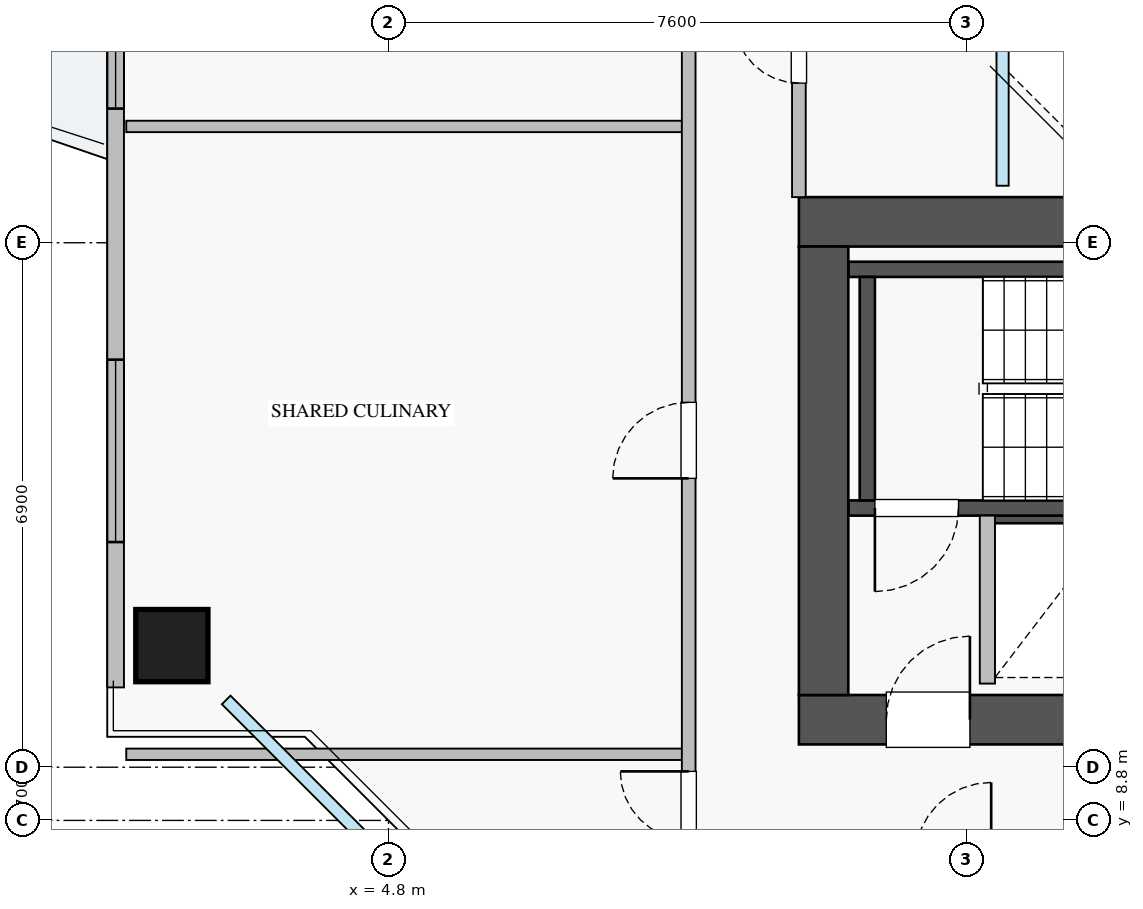
"""IFC4 building model, lengths in metres.
Left out: names, types, materials, properties, quantities, classifications, styles, units other than length and angle.
Written with IfcOpenShell. Run it as: python <this file> out.ifc"""

import sys

from ifc_helpers import new_model, si_unit, direction, frame, frame_2d, origin, origin_2d, place, context, subcontext, project, spatial, rectangle, extrude, source, transform, mapped, element, fill, save


model = new_model("IFC4")
c1 = context("Model", 3, precision=1e-05, world=origin(), true_north=direction((0.0, 1.0)))
c2 = subcontext(c1, "Body", "Model", "MODEL_VIEW")
j1 = project(units=[si_unit("LENGTHUNIT", "METRE"), si_unit("PLANEANGLEUNIT", "RADIAN")], contexts=[c1])
p1 = place(None, origin())
s1 = spatial("IfcSite", under=j1, at=p1, CompositionType="ELEMENT")
p2 = place(p1, origin())
s2 = spatial("IfcBuilding", under=s1, at=p2, CompositionType="ELEMENT")
p3 = place(p2, frame((0.0, 0.0, 150.25)))
s3 = spatial("IfcBuildingStorey", under=s2, at=p3, CompositionType="ELEMENT", Elevation=150.25)
p4 = place(p3, frame((12.68, 12.8, 0.0), z_axis=(0.0, 0.0, 1.0), x_axis=(1.0, 0.0, 0.0)))
e1 = element("IfcWall", 1, at=p4, inside=s3, PredefinedType="SHEAR", context=c2, shape_type="SweptSolid", body=[
    extrude(rectangle(XDim=1.94, YDim=0.18, at=frame_2d((0.97, 0.0))), origin(), (0.0, 0.0, 1.0), 3.07),
])
p5 = place(p3, frame((10.85, 12.91, 0.0), z_axis=(0.0, 0.0, 1.0), x_axis=(1.0, 0.0, 0.0)))
e2 = element("IfcWall", 2, at=p5, inside=s3, PredefinedType="SHEAR", context=c2, shape_type="SweptSolid", body=[
    extrude(rectangle(XDim=7.3, YDim=0.2, at=frame_2d((3.65, 0.0))), origin(), (0.0, 0.0, 1.0), 3.25),
])
p6 = place(p5, frame((0.35, 0.0, 0.0)))
e3 = element("IfcOpeningElement", 3, at=p6, cuts=e2, PredefinedType="OPENING", context=c2, shape_type="SweptSolid", body=[
    extrude(rectangle(XDim=1.1, YDim=2.05, at=frame_2d((0.55, 1.025))), frame((0.0, 0.11, 0.0), z_axis=(0.0, -1.0, 0.0), x_axis=(1.0, 0.0, 0.0)), (0.0, 0.0, 1.0), 0.22),
])
p7 = place(p3, frame((10.85, 16.05, 0.0), z_axis=(0.0, 0.0, 1.0), x_axis=(1.0, 0.0, 0.0)))
e4 = element("IfcWall", 4, at=p7, inside=s3, PredefinedType="SHEAR", context=c2, shape_type="SweptSolid", body=[
    extrude(rectangle(XDim=7.3, YDim=0.2, at=frame_2d((3.65, 0.0))), origin(), (0.0, 0.0, 1.0), 3.25),
])
p8 = place(p3, frame((11.1, 13.01, 0.0), z_axis=(0.0, 0.0, 1.0), x_axis=(0.0, 1.0, 0.0)))
e5 = element("IfcWall", 5, at=p8, inside=s3, PredefinedType="SHEAR", context=c2, shape_type="SweptSolid", body=[
    extrude(rectangle(XDim=2.94, YDim=0.2, at=frame_2d((1.47, 0.0))), origin(), (0.0, 0.0, 1.0), 3.25),
])
p9 = place(p3, frame((10.2, 10.125, 0.0), z_axis=(0.0, 0.0, 1.0), x_axis=(1.0, 0.0, 0.0)))
e6 = element("IfcWall", 6, at=p9, inside=s3, PredefinedType="SHEAR", context=c2, shape_type="SweptSolid", body=[
    extrude(rectangle(XDim=17.6, YDim=0.65, at=frame_2d((8.8, 0.0))), origin(), (0.0, 0.0, 1.0), 3.25),
])
p10 = place(p9, frame((1.15, 0.0, 0.0)))
e7 = element("IfcOpeningElement", 7, at=p10, cuts=e6, PredefinedType="OPENING", context=c2, shape_type="SweptSolid", body=[
    extrude(rectangle(XDim=1.1, YDim=2.05, at=frame_2d((0.55, 1.025))), frame((0.0, 0.335, 0.0), z_axis=(0.0, -1.0, 0.0), x_axis=(1.0, 0.0, 0.0)), (0.0, 0.0, 1.0), 0.67),
])
p11 = place(p9, frame((8.3, 0.0, 0.0)))
e8 = element("IfcOpeningElement", 8, at=p11, cuts=e6, PredefinedType="OPENING", context=c2, shape_type="SweptSolid", body=[
    extrude(rectangle(XDim=1.1, YDim=2.05, at=frame_2d((0.55, 1.025))), frame((0.0, 0.335, 0.0), z_axis=(0.0, -1.0, 0.0), x_axis=(1.0, 0.0, 0.0)), (0.0, 0.0, 1.0), 0.67),
])
p12 = place(p9, frame((4.9, 0.0, 0.0)))
e9 = element("IfcOpeningElement", 9, at=p12, cuts=e6, PredefinedType="OPENING", context=c2, shape_type="SweptSolid", body=[
    extrude(rectangle(XDim=1.1, YDim=2.05, at=frame_2d((0.55, 1.025))), frame((0.0, 0.335, 0.0), z_axis=(0.0, -1.0, 0.0), x_axis=(1.0, 0.0, 0.0)), (0.0, 0.0, 1.0), 0.67),
])
p13 = place(p9, frame((14.74, 0.0, 0.0)))
e10 = element("IfcOpeningElement", 10, at=p13, cuts=e6, PredefinedType="OPENING", context=c2, shape_type="SweptSolid", body=[
    extrude(rectangle(XDim=1.0, YDim=2.05, at=frame_2d((0.5, 1.025))), frame((0.0, 0.335, 0.0), z_axis=(0.0, -1.0, 0.0), x_axis=(1.0, 0.0, 0.0)), (0.0, 0.0, 1.0), 0.67),
])
p14 = place(p9, frame((10.64, 0.0, 0.0)))
e11 = element("IfcOpeningElement", 11, at=p14, cuts=e6, PredefinedType="OPENING", context=c2, shape_type="SweptSolid", body=[
    extrude(rectangle(XDim=1.0, YDim=2.05, at=frame_2d((0.5, 1.025))), frame((0.0, 0.335, 0.0), z_axis=(0.0, -1.0, 0.0), x_axis=(1.0, 0.0, 0.0)), (0.0, 0.0, 1.0), 0.67),
])
p15 = place(p9, frame((13.09, 0.0, 0.0)))
e12 = element("IfcOpeningElement", 12, at=p15, cuts=e6, PredefinedType="OPENING", context=c2, shape_type="SweptSolid", body=[
    extrude(rectangle(XDim=1.0, YDim=2.05, at=frame_2d((0.5, 1.025))), frame((0.0, 0.335, 0.0), z_axis=(0.0, -1.0, 0.0), x_axis=(1.0, 0.0, 0.0)), (0.0, 0.0, 1.0), 0.67),
])
p16 = place(p3, frame((10.2, 16.675, 0.0), z_axis=(0.0, 0.0, 1.0), x_axis=(1.0, 0.0, 0.0)))
e13 = element("IfcWall", 13, at=p16, inside=s3, PredefinedType="SHEAR", context=c2, shape_type="SweptSolid", body=[
    extrude(rectangle(XDim=17.6, YDim=0.65, at=frame_2d((8.8, 0.0))), origin(), (0.0, 0.0, 1.0), 3.25),
])
p17 = place(p3, frame((10.525, 10.45, 0.0), z_axis=(0.0, 0.0, 1.0), x_axis=(0.0, 1.0, 0.0)))
e14 = element("IfcWall", 14, at=p17, inside=s3, PredefinedType="SHEAR", context=c2, shape_type="SweptSolid", body=[
    extrude(rectangle(XDim=5.9, YDim=0.65, at=frame_2d((2.95, 0.0))), origin(), (0.0, 0.0, 1.0), 3.25),
])
m1 = source(origin(), c2, "Body", "SweptSolid", [
    extrude(rectangle(XDim=0.95, YDim=0.95, at=origin_2d()), origin(), (0.0, 0.0, 1.0), 3.25),
])
p18 = place(p3, frame((1.95, 11.1, 0.0), z_axis=(0.0, 0.0, 1.0), x_axis=(1.0, 0.0, 0.0)))
e15 = element("IfcColumn", 15, at=p18, inside=s3, PredefinedType="COLUMN", context=c2, shape_type="MappedRepresentation", body=[
    mapped(m1, transform((0.0, 0.0, 0.0), x_axis=(1.0, 0.0, 0.0), y_axis=(0.0, 1.0, 0.0), z_axis=(0.0, 0.0, 1.0), scale=1.0)),
])
p19 = place(p3, frame((1.21, 10.55, 0.0), z_axis=(0.0, 0.0, 1.0), x_axis=(0.0, 1.0, 0.0)))
e16 = element("IfcWall", 16, at=p19, inside=s3, PredefinedType="STANDARD", context=c2, shape_type="SweptSolid", body=[
    extrude(rectangle(XDim=24.9, YDim=0.22, at=frame_2d((12.45, 0.0))), origin(), (0.0, 0.0, 1.0), 2.61),
])
p20 = place(p19, frame((13.3, 0.0, 0.0)))
e17 = element("IfcOpeningElement", 17, at=p20, cuts=e16, PredefinedType="OPENING", context=c2, shape_type="SweptSolid", body=[
    extrude(rectangle(XDim=1.2, YDim=2.1, at=frame_2d((0.6, 1.05))), frame((0.0, 0.12, 0.0), z_axis=(0.0, -1.0, 0.0), x_axis=(1.0, 0.0, 0.0)), (0.0, 0.0, 1.0), 0.24),
])
p21 = place(p19, frame((1.912, 0.0, 0.9)))
e18 = element("IfcOpeningElement", 18, at=p21, cuts=e16, PredefinedType="OPENING", context=c2, shape_type="SweptSolid", body=[
    extrude(rectangle(XDim=2.4, YDim=1.48, at=frame_2d((1.2, 0.74))), frame((0.0, 0.12, 0.0), z_axis=(0.0, -1.0, 0.0), x_axis=(1.0, 0.0, 0.0)), (0.0, 0.0, 1.0), 0.24),
])
p22 = place(p19, frame((21.82, 0.0, 0.9)))
e19 = element("IfcOpeningElement", 19, at=p22, cuts=e16, PredefinedType="OPENING", context=c2, shape_type="SweptSolid", body=[
    extrude(rectangle(XDim=2.1, YDim=1.5, at=frame_2d((1.05, 0.75))), frame((0.0, 0.12, 0.0), z_axis=(0.0, -1.0, 0.0), x_axis=(1.0, 0.0, 0.0)), (0.0, 0.0, 1.0), 0.24),
])
p23 = place(p19, frame((12.05, 0.0, 0.9)))
e20 = element("IfcOpeningElement", 20, at=p23, cuts=e16, PredefinedType="OPENING", context=c2, shape_type="SweptSolid", body=[
    extrude(rectangle(XDim=0.9, YDim=1.2, at=frame_2d((0.45, 0.6))), frame((0.0, 0.12, 0.0), z_axis=(0.0, -1.0, 0.0), x_axis=(1.0, 0.0, 0.0)), (0.0, 0.0, 1.0), 0.24),
])
p24 = place(p19, frame((7.615, 0.0, 0.9)))
e21 = element("IfcOpeningElement", 21, at=p24, cuts=e16, PredefinedType="OPENING", context=c2, shape_type="SweptSolid", body=[
    extrude(rectangle(XDim=0.9, YDim=1.2, at=frame_2d((0.45, 0.6))), frame((0.0, 0.12, 0.0), z_axis=(0.0, -1.0, 0.0), x_axis=(1.0, 0.0, 0.0)), (0.0, 0.0, 1.0), 0.24),
])
p25 = place(p19, frame((16.895, 0.0, 0.9)))
e22 = element("IfcOpeningElement", 22, at=p25, cuts=e16, PredefinedType="OPENING", context=c2, shape_type="SweptSolid", body=[
    extrude(rectangle(XDim=0.9, YDim=1.2, at=frame_2d((0.45, 0.6))), frame((0.0, 0.12, 0.0), z_axis=(0.0, -1.0, 0.0), x_axis=(1.0, 0.0, 0.0)), (0.0, 0.0, 1.0), 0.24),
])
p26 = place(p3, frame((12.68, 10.6, 0.0), z_axis=(0.0, 0.0, 1.0), x_axis=(0.0, 1.0, 0.0)))
e23 = element("IfcWall", 23, at=p26, inside=s3, PredefinedType="PARTITIONING", context=c2, shape_type="SweptSolid", body=[
    extrude(rectangle(XDim=2.21, YDim=0.2, at=frame_2d((1.105, 0.0))), origin(), (0.0, 0.0, 1.0), 3.07),
])
for number, where, z_axis, x_axis in (
    (24, (1.35, 9.67, 0.0), (0.0, 0.0, 1.0), (1.0, 0.0, 0.0)),
    (25, (1.35, 17.93, 0.0), (0.0, 0.0, 1.0), (1.0, 0.0, 0.0)),
):
    element("IfcWall", number, at=place(p3, frame(where, z_axis=z_axis, x_axis=x_axis)), inside=s3, PredefinedType="PARTITIONING", context=c2, shape_type="SweptSolid", body=[
        extrude(rectangle(XDim=7.4, YDim=0.15, at=frame_2d((3.7, 0.0))), origin(), (0.0, 0.0, 1.0), 3.07),
    ])
p27 = place(p3, frame((8.75, 8.3, 0.0), z_axis=(0.0, 0.0, 1.0), x_axis=(0.0, 1.0, 0.0)))
e26 = element("IfcWall", 26, at=p27, inside=s3, PredefinedType="PARTITIONING", context=c2, shape_type="SweptSolid", body=[
    extrude(rectangle(XDim=29.4, YDim=0.18, at=frame_2d((14.7, 0.0))), origin(), (0.0, 0.0, 1.0), 3.07),
])
p28 = place(p27, frame((28.08, 0.0, 0.0)))
e27 = element("IfcOpeningElement", 27, at=p28, cuts=e26, PredefinedType="OPENING", context=c2, shape_type="SweptSolid", body=[
    extrude(rectangle(XDim=0.9, YDim=2.05, at=frame_2d((0.45, 1.025))), frame((0.0, 0.1, 0.0), z_axis=(0.0, -1.0, 0.0), x_axis=(1.0, 0.0, 0.0)), (0.0, 0.0, 1.0), 0.2),
])
p29 = place(p27, frame((0.245, 0.0, 0.0)))
e28 = element("IfcOpeningElement", 28, at=p29, cuts=e26, PredefinedType="OPENING", context=c2, shape_type="SweptSolid", body=[
    extrude(rectangle(XDim=0.9, YDim=2.05, at=frame_2d((0.45, 1.025))), frame((0.0, 0.1, 0.0), z_axis=(0.0, -1.0, 0.0), x_axis=(1.0, 0.0, 0.0)), (0.0, 0.0, 1.0), 0.2),
])
p30 = place(p27, frame((5.0, 0.0, 0.0)))
e29 = element("IfcOpeningElement", 29, at=p30, cuts=e26, PredefinedType="OPENING", context=c2, shape_type="SweptSolid", body=[
    extrude(rectangle(XDim=1.0, YDim=2.05, at=frame_2d((0.5, 1.025))), frame((0.0, 0.1, 0.0), z_axis=(0.0, -1.0, 0.0), x_axis=(1.0, 0.0, 0.0)), (0.0, 0.0, 1.0), 0.2),
])
p31 = place(p27, frame((11.165, 0.0, 0.0)))
e30 = element("IfcOpeningElement", 30, at=p31, cuts=e26, PredefinedType="OPENING", context=c2, shape_type="SweptSolid", body=[
    extrude(rectangle(XDim=1.0, YDim=2.05, at=frame_2d((0.5, 1.025))), frame((0.0, 0.1, 0.0), z_axis=(0.0, -1.0, 0.0), x_axis=(1.0, 0.0, 0.0)), (0.0, 0.0, 1.0), 0.2),
])
p32 = place(p27, frame((20.325, 0.0, 0.0)))
e31 = element("IfcOpeningElement", 31, at=p32, cuts=e26, PredefinedType="OPENING", context=c2, shape_type="SweptSolid", body=[
    extrude(rectangle(XDim=1.0, YDim=2.05, at=frame_2d((0.5, 1.025))), frame((0.0, 0.1, 0.0), z_axis=(0.0, -1.0, 0.0), x_axis=(1.0, 0.0, 0.0)), (0.0, 0.0, 1.0), 0.2),
])
p33 = place(p3, frame((10.2, 17.0, 0.0), z_axis=(0.0, 0.0, 1.0), x_axis=(0.0, 1.0, 0.0)))
e32 = element("IfcWall", 32, at=p33, inside=s3, PredefinedType="PARTITIONING", context=c2, shape_type="SweptSolid", body=[
    extrude(rectangle(XDim=12.0, YDim=0.18, at=frame_2d((6.0, 0.0))), origin(), (0.0, 0.0, 1.0), 3.07),
])
p34 = place(p33, frame((1.5, 0.0, 0.0)))
e33 = element("IfcOpeningElement", 33, at=p34, cuts=e32, PredefinedType="OPENING", context=c2, shape_type="SweptSolid", body=[
    extrude(rectangle(XDim=0.85, YDim=2.05, at=frame_2d((0.425, 1.025))), frame((0.0, 0.1, 0.0), z_axis=(0.0, -1.0, 0.0), x_axis=(1.0, 0.0, 0.0)), (0.0, 0.0, 1.0), 0.2),
])
p35 = place(p33, frame((6.5, 0.0, 0.0)))
e34 = element("IfcOpeningElement", 34, at=p35, cuts=e32, PredefinedType="OPENING", context=c2, shape_type="SweptSolid", body=[
    extrude(rectangle(XDim=1.0, YDim=2.05, at=frame_2d((0.5, 1.025))), frame((0.0, 0.1, 0.0), z_axis=(0.0, -1.0, 0.0), x_axis=(1.0, 0.0, 0.0)), (0.0, 0.0, 1.0), 0.2),
])
m2 = source(origin(), c2, "Body", "SweptSolid", [
    extrude(rectangle(XDim=2.4, YDim=1.48, at=frame_2d((1.2, 0.74))), frame((0.0, 0.03, 0.0), z_axis=(0.0, -1.0, 0.0), x_axis=(1.0, 0.0, 0.0)), (0.0, 0.0, 1.0), 0.06),
])
p36 = place(p21, origin())
e35 = element("IfcWindow", 35, at=p36, inside=s3, PartitioningType="TRIPLE_PANEL_VERTICAL", PredefinedType="WINDOW", context=c2, shape_type="MappedRepresentation", body=[
    mapped(m2, transform((0.0, 0.0, 0.0), x_axis=(1.0, 0.0, 0.0), y_axis=(0.0, 1.0, 0.0), z_axis=(0.0, 0.0, 1.0), scale=1.0)),
])
fill(e18, e35)
m3 = source(origin(), c2, "Body", "SweptSolid", [
    extrude(rectangle(XDim=1.1, YDim=2.05, at=frame_2d((0.55, 1.025))), frame((0.0, 0.025, 0.0), z_axis=(0.0, -1.0, 0.0), x_axis=(1.0, 0.0, 0.0)), (0.0, 0.0, 1.0), 0.05),
])
p37 = place(p10, origin())
e36 = element("IfcDoor", 36, at=p37, inside=s3, OperationType="SINGLE_SWING_RIGHT", PredefinedType="DOOR", context=c2, shape_type="MappedRepresentation", body=[
    mapped(m3, transform((0.0, 0.0, 0.0), x_axis=(1.0, 0.0, 0.0), y_axis=(0.0, 1.0, 0.0), z_axis=(0.0, 0.0, 1.0), scale=1.0)),
])
fill(e7, e36)
p38 = place(p6, frame((1.1, 0.0, 0.0), z_axis=(0.0, 0.0, 1.0), x_axis=(-1.0, 0.0, 0.0)))
e37 = element("IfcDoor", 37, at=p38, inside=s3, OperationType="SINGLE_SWING_LEFT", PredefinedType="DOOR", context=c2, shape_type="MappedRepresentation", body=[
    mapped(m3, transform((0.0, 0.0, 0.0), x_axis=(1.0, 0.0, 0.0), y_axis=(0.0, 1.0, 0.0), z_axis=(0.0, 0.0, 1.0), scale=1.0)),
])
fill(e3, e37)
m4 = source(origin(), c2, "Body", "SweptSolid", [
    extrude(rectangle(XDim=0.9, YDim=2.05, at=frame_2d((0.45, 1.025))), frame((0.0, 0.025, 0.0), z_axis=(0.0, -1.0, 0.0), x_axis=(1.0, 0.0, 0.0)), (0.0, 0.0, 1.0), 0.05),
])
p39 = place(p29, origin())
e38 = element("IfcDoor", 38, at=p39, inside=s3, OperationType="SINGLE_SWING_RIGHT", PredefinedType="DOOR", context=c2, shape_type="MappedRepresentation", body=[
    mapped(m4, transform((0.0, 0.0, 0.0), x_axis=(1.0, 0.0, 0.0), y_axis=(0.0, 1.0, 0.0), z_axis=(0.0, 0.0, 1.0), scale=1.0)),
])
fill(e28, e38)
m5 = source(origin(), c2, "Body", "SweptSolid", [
    extrude(rectangle(XDim=1.0, YDim=2.05, at=frame_2d((0.5, 1.025))), frame((0.0, 0.025, 0.0), z_axis=(0.0, -1.0, 0.0), x_axis=(1.0, 0.0, 0.0)), (0.0, 0.0, 1.0), 0.05),
])
p40 = place(p30, origin())
e39 = element("IfcDoor", 39, at=p40, inside=s3, OperationType="SINGLE_SWING_LEFT", PredefinedType="DOOR", context=c2, shape_type="MappedRepresentation", body=[
    mapped(m5, transform((0.0, 0.0, 0.0), x_axis=(1.0, 0.0, 0.0), y_axis=(0.0, 1.0, 0.0), z_axis=(0.0, 0.0, 1.0), scale=1.0)),
])
fill(e29, e39)
m6 = source(origin(), c2, "Body", "SweptSolid", [
    extrude(rectangle(XDim=0.85, YDim=2.05, at=frame_2d((0.425, 1.025))), frame((0.0, 0.025, 0.0), z_axis=(0.0, -1.0, 0.0), x_axis=(1.0, 0.0, 0.0)), (0.0, 0.0, 1.0), 0.05),
])
p41 = place(p34, origin())
e40 = element("IfcDoor", 40, at=p41, inside=s3, OperationType="SINGLE_SWING_RIGHT", PredefinedType="DOOR", context=c2, shape_type="MappedRepresentation", body=[
    mapped(m6, transform((0.0, 0.0, 0.0), x_axis=(1.0, 0.0, 0.0), y_axis=(0.0, 1.0, 0.0), z_axis=(0.0, 0.0, 1.0), scale=1.0)),
])
fill(e33, e40)
m7 = source(origin(), c2, "Body", "SweptSolid", [
    extrude(rectangle(XDim=0.9, YDim=1.2, at=frame_2d((0.45, 0.6))), frame((0.0, 0.03, 0.0), z_axis=(0.0, -1.0, 0.0), x_axis=(1.0, 0.0, 0.0)), (0.0, 0.0, 1.0), 0.06),
])
p42 = place(p24, origin())
e41 = element("IfcWindow", 41, at=p42, inside=s3, PartitioningType="SINGLE_PANEL", PredefinedType="WINDOW", context=c2, shape_type="MappedRepresentation", body=[
    mapped(m7, transform((0.0, 0.0, 0.0), x_axis=(1.0, 0.0, 0.0), y_axis=(0.0, 1.0, 0.0), z_axis=(0.0, 0.0, 1.0), scale=1.0)),
])
fill(e21, e41)
save(model, sys.argv[1])
